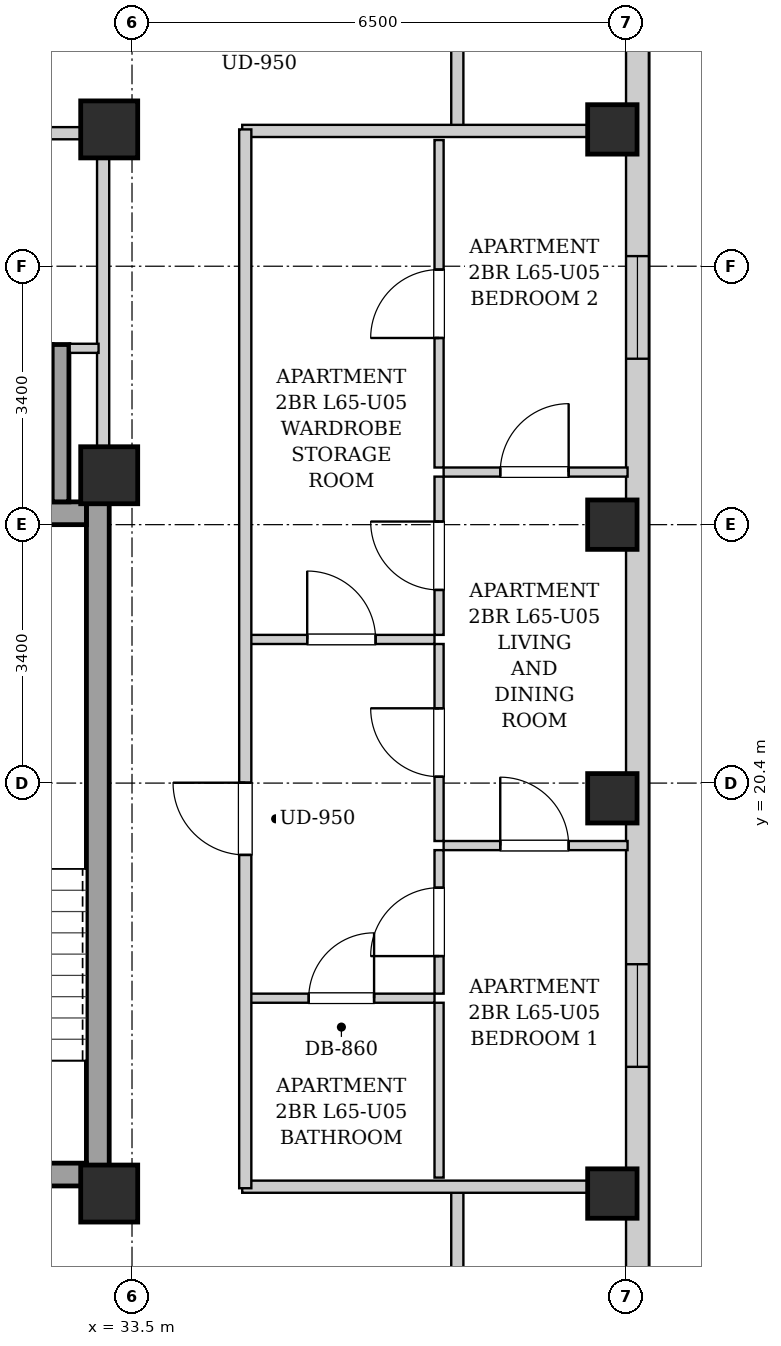
"""IFC4 building model, lengths in metres.
Left out: names, types, materials, properties, quantities, classifications, styles, units other than length and angle.
Written with IfcOpenShell. Run it as: python <this file> out.ifc"""

import sys

from ifc_helpers import new_model, si_unit, direction, frame, frame_2d, origin, origin_2d, place, context, subcontext, project, spatial, rectangle, extrude, element, fill, save


model = new_model("IFC4")
c1 = context("Model", 3, precision=1e-05, world=origin(), true_north=direction((0.0, 1.0)))
c2 = subcontext(c1, "Body", "Model", "MODEL_VIEW")
j1 = project(units=[si_unit("LENGTHUNIT", "METRE"), si_unit("PLANEANGLEUNIT", "RADIAN")], contexts=[c1])
p1 = place(None, origin())
s1 = spatial("IfcSite", under=j1, at=p1, CompositionType="ELEMENT")
p2 = place(p1, origin())
s2 = spatial("IfcBuilding", under=s1, at=p2, CompositionType="ELEMENT")
p3 = place(p2, frame((0.0, 0.0, 224.1)))
s3 = spatial("IfcBuildingStorey", under=s2, at=p3, CompositionType="ELEMENT", Elevation=224.1)
for number, where, z_axis, x_axis in (
    (1, (39.82, 15.0, 0.0), (0.0, 0.0, 1.0), (1.0, 0.0, 0.0)),
    (2, (39.82, 20.2, 0.0), (0.0, 0.0, 1.0), (1.0, 0.0, 0.0)),
    (3, (39.82, 23.8, 0.0), (0.0, 0.0, 1.0), (1.0, 0.0, 0.0)),
    (4, (39.82, 29.0, 0.0), (0.0, 0.0, 1.0), (1.0, 0.0, 0.0)),
):
    element("IfcColumn", number, at=place(p3, frame(where, z_axis=z_axis, x_axis=x_axis)), inside=s3, PredefinedType="COLUMN", context=c2, shape_type="SweptSolid", body=[
        extrude(rectangle(XDim=0.65, YDim=0.65, at=origin_2d()), origin(), (0.0, 0.0, 1.0), 3.4),
    ])
for number, where, z_axis, x_axis in (
    (5, (33.2, 15.0, 0.0), (0.0, 0.0, 1.0), (1.0, 0.0, 0.0)),
    (6, (33.2, 29.0, 0.0), (0.0, 0.0, 1.0), (1.0, 0.0, 0.0)),
    (7, (33.2, 24.45, 0.0), (0.0, 0.0, 1.0), (1.0, 0.0, 0.0)),
):
    element("IfcColumn", number, at=place(p3, frame(where, z_axis=z_axis, x_axis=x_axis)), inside=s3, PredefinedType="COLUMN", context=c2, shape_type="SweptSolid", body=[
        extrude(rectangle(XDim=0.75, YDim=0.75, at=origin_2d()), origin(), (0.0, 0.0, 1.0), 3.4),
    ])
p4 = place(p3, frame((40.15, 37.7, 0.0), z_axis=(0.0, 0.0, 1.0), x_axis=(0.0, -1.0, 0.0)))
e8 = element("IfcWall", 8, at=p4, inside=s3, PredefinedType="SOLIDWALL", context=c2, shape_type="SweptSolid", body=[
    extrude(rectangle(XDim=31.4, YDim=0.3, at=frame_2d((15.7, 0.0))), origin(), (0.0, 0.0, 1.0), 3.14),
])
p5 = place(p4, frame((28.396, 0.0, 0.55)))
e9 = element("IfcOpeningElement", 9, at=p5, cuts=e8, PredefinedType="OPENING", context=c2, shape_type="SweptSolid", body=[
    extrude(rectangle(XDim=1.35, YDim=1.2, at=frame_2d((0.675, 0.6))), frame((0.0, 0.16, 0.0), z_axis=(0.0, -1.0, 0.0), x_axis=(1.0, 0.0, 0.0)), (0.0, 0.0, 1.0), 0.32),
])
p6 = place(p4, frame((1.653, 0.0, 0.55)))
e10 = element("IfcOpeningElement", 10, at=p6, cuts=e8, PredefinedType="OPENING", context=c2, shape_type="SweptSolid", body=[
    extrude(rectangle(XDim=1.35, YDim=1.2, at=frame_2d((0.675, 0.6))), frame((0.0, 0.16, 0.0), z_axis=(0.0, -1.0, 0.0), x_axis=(1.0, 0.0, 0.0)), (0.0, 0.0, 1.0), 0.32),
])
p7 = place(p4, frame((19.683, 0.0, 0.55)))
e11 = element("IfcOpeningElement", 11, at=p7, cuts=e8, PredefinedType="OPENING", context=c2, shape_type="SweptSolid", body=[
    extrude(rectangle(XDim=1.35, YDim=1.2, at=frame_2d((0.675, 0.6))), frame((0.0, 0.16, 0.0), z_axis=(0.0, -1.0, 0.0), x_axis=(1.0, 0.0, 0.0)), (0.0, 0.0, 1.0), 0.32),
])
p8 = place(p4, frame((10.367, 0.0, 0.55)))
e12 = element("IfcOpeningElement", 12, at=p8, cuts=e8, PredefinedType="OPENING", context=c2, shape_type="SweptSolid", body=[
    extrude(rectangle(XDim=1.35, YDim=1.2, at=frame_2d((0.675, 0.6))), frame((0.0, 0.16, 0.0), z_axis=(0.0, -1.0, 0.0), x_axis=(1.0, 0.0, 0.0)), (0.0, 0.0, 1.0), 0.32),
])
p9 = place(p3, frame((33.05, 15.1, 0.0), z_axis=(0.0, 0.0, 1.0), x_axis=(0.0, 1.0, 0.0)))
e13 = element("IfcWall", 13, at=p9, inside=s3, PredefinedType="SHEAR", context=c2, shape_type="SweptSolid", body=[
    extrude(rectangle(XDim=9.0, YDim=0.3, at=frame_2d((4.5, 0.0))), origin(), (0.0, 0.0, 1.0), 3.14),
])
p10 = place(p3, frame((30.05, 23.95, 0.0), z_axis=(0.0, 0.0, 1.0), x_axis=(1.0, 0.0, 0.0)))
e14 = element("IfcWall", 14, at=p10, inside=s3, PredefinedType="SHEAR", context=c2, shape_type="SweptSolid", body=[
    extrude(rectangle(XDim=2.85, YDim=0.3, at=frame_2d((1.425, 0.0))), origin(), (0.0, 0.0, 1.0), 3.14),
])
p11 = place(p3, frame((30.05, 15.25, 0.0), z_axis=(0.0, 0.0, 1.0), x_axis=(1.0, 0.0, 0.0)))
e15 = element("IfcWall", 15, at=p11, inside=s3, PredefinedType="SHEAR", context=c2, shape_type="SweptSolid", body=[
    extrude(rectangle(XDim=2.85, YDim=0.3, at=frame_2d((1.425, 0.0))), origin(), (0.0, 0.0, 1.0), 3.14),
])
p12 = place(p11, frame((0.86, 0.0, 0.0)))
e16 = element("IfcOpeningElement", 16, at=p12, cuts=e15, PredefinedType="OPENING", context=c2, shape_type="SweptSolid", body=[
    extrude(rectangle(XDim=1.1, YDim=2.05, at=frame_2d((0.55, 1.025))), frame((0.0, 0.16, 0.0), z_axis=(0.0, -1.0, 0.0), x_axis=(1.0, 0.0, 0.0)), (0.0, 0.0, 1.0), 0.32),
])
p13 = place(p3, frame((32.56, 24.1, 0.0), z_axis=(0.0, 0.0, 1.0), x_axis=(0.0, 1.0, 0.0)))
e17 = element("IfcWall", 17, at=p13, inside=s3, PredefinedType="SHEAR", context=c2, shape_type="SweptSolid", body=[
    extrude(rectangle(XDim=2.07, YDim=0.22, at=frame_2d((1.035, 0.0))), origin(), (0.0, 0.0, 1.0), 3.14),
])
p14 = place(p3, frame((33.12, 24.12, 0.0), z_axis=(0.0, 0.0, 1.0), x_axis=(0.0, 1.0, 0.0)))
e18 = element("IfcWall", 18, at=p14, inside=s3, PredefinedType="PARTITIONING", context=c2, shape_type="SweptSolid", body=[
    extrude(rectangle(XDim=4.76, YDim=0.16, at=frame_2d((2.38, 0.0))), origin(), (0.0, 0.0, 1.0), 3.14),
])
p15 = place(p3, frame((32.68, 26.12, 0.0), z_axis=(0.0, 0.0, 1.0), x_axis=(1.0, 0.0, 0.0)))
e19 = element("IfcWall", 19, at=p15, inside=s3, PredefinedType="PARTITIONING", context=c2, shape_type="SweptSolid", body=[
    extrude(rectangle(XDim=0.38, YDim=0.12, at=frame_2d((0.19, 0.0))), origin(), (0.0, 0.0, 1.0), 3.14),
])
p16 = place(p3, frame((30.08, 28.95, 0.0), z_axis=(0.0, 0.0, 1.0), x_axis=(1.0, 0.0, 0.0)))
e20 = element("IfcWall", 20, at=p16, inside=s3, PredefinedType="PARTITIONING", context=c2, shape_type="SweptSolid", body=[
    extrude(rectangle(XDim=2.96, YDim=0.16, at=frame_2d((1.48, 0.0))), origin(), (0.0, 0.0, 1.0), 3.14),
])
p17 = place(p16, frame((1.045, 0.0, 0.0)))
e21 = element("IfcOpeningElement", 21, at=p17, cuts=e20, PredefinedType="OPENING", context=c2, shape_type="SweptSolid", body=[
    extrude(rectangle(XDim=0.86, YDim=2.05, at=frame_2d((0.43, 1.025))), frame((0.0, 0.09, 0.0), z_axis=(0.0, -1.0, 0.0), x_axis=(1.0, 0.0, 0.0)), (0.0, 0.0, 1.0), 0.18),
])
for number, where, z_axis, x_axis in (
    (22, (37.78, 13.51, 0.0), (0.0, 0.0, 1.0), (0.0, 1.0, 0.0)),
    (23, (37.78, 28.98, 0.0), (0.0, 0.0, 1.0), (0.0, 1.0, 0.0)),
):
    element("IfcWall", number, at=place(p3, frame(where, z_axis=z_axis, x_axis=x_axis)), inside=s3, PredefinedType="PARTITIONING", context=c2, shape_type="SweptSolid", body=[
        extrude(rectangle(XDim=1.58, YDim=0.16, at=frame_2d((0.79, 0.0))), origin(), (0.0, 0.0, 1.0), 3.14),
    ])
for number, where, z_axis, x_axis in (
    (24, (34.95, 15.09, 0.0), (0.0, 0.0, 1.0), (1.0, 0.0, 0.0)),
    (25, (34.95, 28.98, 0.0), (0.0, 0.0, 1.0), (1.0, 0.0, 0.0)),
):
    element("IfcWall", number, at=place(p3, frame(where, z_axis=z_axis, x_axis=x_axis)), inside=s3, PredefinedType="PARTITIONING", context=c2, shape_type="SweptSolid", body=[
        extrude(rectangle(XDim=5.07, YDim=0.16, at=frame_2d((2.535, 0.0))), origin(), (0.0, 0.0, 1.0), 2.668),
    ])
p18 = place(p3, frame((35.03, 22.29, 0.0), z_axis=(0.0, 0.0, 1.0), x_axis=(1.0, 0.0, 0.0)))
e26 = element("IfcWall", 26, at=p18, inside=s3, PredefinedType="PARTITIONING", context=c2, shape_type="SweptSolid", body=[
    extrude(rectangle(XDim=2.45, YDim=0.12, at=frame_2d((1.225, 0.0))), origin(), (0.0, 0.0, 1.0), 3.14),
])
p19 = place(p18, frame((0.775, 0.0, 0.0)))
e27 = element("IfcOpeningElement", 27, at=p19, cuts=e26, PredefinedType="OPENING", context=c2, shape_type="SweptSolid", body=[
    extrude(rectangle(XDim=0.9, YDim=2.05, at=frame_2d((0.45, 1.025))), frame((0.0, 0.07, 0.0), z_axis=(0.0, -1.0, 0.0), x_axis=(1.0, 0.0, 0.0)), (0.0, 0.0, 1.0), 0.14),
])
p20 = place(p3, frame((37.54, 22.35, 0.0), z_axis=(0.0, 0.0, 1.0), x_axis=(0.0, 1.0, 0.0)))
e28 = element("IfcWall", 28, at=p20, inside=s3, PredefinedType="PARTITIONING", context=c2, shape_type="SweptSolid", body=[
    extrude(rectangle(XDim=2.082, YDim=0.12, at=frame_2d((1.041, 0.0))), origin(), (0.0, 0.0, 1.0), 3.14),
])
p21 = place(p20, frame((0.591, 0.0, 0.0)))
e29 = element("IfcOpeningElement", 29, at=p21, cuts=e28, PredefinedType="OPENING", context=c2, shape_type="SweptSolid", body=[
    extrude(rectangle(XDim=0.9, YDim=2.05, at=frame_2d((0.45, 1.025))), frame((0.0, 0.07, 0.0), z_axis=(0.0, -1.0, 0.0), x_axis=(1.0, 0.0, 0.0)), (0.0, 0.0, 1.0), 0.14),
])
p22 = place(p3, frame((37.54, 24.552, 0.0), z_axis=(0.0, 0.0, 1.0), x_axis=(0.0, 1.0, 0.0)))
e30 = element("IfcWall", 30, at=p22, inside=s3, PredefinedType="PARTITIONING", context=c2, shape_type="SweptSolid", body=[
    extrude(rectangle(XDim=4.308, YDim=0.12, at=frame_2d((2.154, 0.0))), origin(), (0.0, 0.0, 1.0), 3.14),
])
p23 = place(p22, frame((1.704, 0.0, 0.0)))
e31 = element("IfcOpeningElement", 31, at=p23, cuts=e30, PredefinedType="OPENING", context=c2, shape_type="SweptSolid", body=[
    extrude(rectangle(XDim=0.9, YDim=2.05, at=frame_2d((0.45, 1.025))), frame((0.0, 0.07, 0.0), z_axis=(0.0, -1.0, 0.0), x_axis=(1.0, 0.0, 0.0)), (0.0, 0.0, 1.0), 0.14),
])
p24 = place(p3, frame((35.03, 17.57, 0.0), z_axis=(0.0, 0.0, 1.0), x_axis=(1.0, 0.0, 0.0)))
e32 = element("IfcWall", 32, at=p24, inside=s3, PredefinedType="PARTITIONING", context=c2, shape_type="SweptSolid", body=[
    extrude(rectangle(XDim=2.45, YDim=0.12, at=frame_2d((1.225, 0.0))), origin(), (0.0, 0.0, 1.0), 3.14),
])
p25 = place(p24, frame((0.795, 0.0, 0.0)))
e33 = element("IfcOpeningElement", 33, at=p25, cuts=e32, PredefinedType="OPENING", context=c2, shape_type="SweptSolid", body=[
    extrude(rectangle(XDim=0.86, YDim=2.05, at=frame_2d((0.43, 1.025))), frame((0.0, 0.07, 0.0), z_axis=(0.0, -1.0, 0.0), x_axis=(1.0, 0.0, 0.0)), (0.0, 0.0, 1.0), 0.14),
])
p26 = place(p3, frame((37.54, 15.21, 0.0), z_axis=(0.0, 0.0, 1.0), x_axis=(0.0, 1.0, 0.0)))
e34 = element("IfcWall", 34, at=p26, inside=s3, PredefinedType="PARTITIONING", context=c2, shape_type="SweptSolid", body=[
    extrude(rectangle(XDim=2.3, YDim=0.12, at=frame_2d((1.15, 0.0))), origin(), (0.0, 0.0, 1.0), 3.14),
])
p27 = place(p3, frame((37.54, 17.63, 0.0), z_axis=(0.0, 0.0, 1.0), x_axis=(0.0, 1.0, 0.0)))
e35 = element("IfcWall", 35, at=p27, inside=s3, PredefinedType="PARTITIONING", context=c2, shape_type="SweptSolid", body=[
    extrude(rectangle(XDim=1.888, YDim=0.12, at=frame_2d((0.944, 0.0))), origin(), (0.0, 0.0, 1.0), 3.14),
])
p28 = place(p27, frame((0.494, 0.0, 0.0)))
e36 = element("IfcOpeningElement", 36, at=p28, cuts=e35, PredefinedType="OPENING", context=c2, shape_type="SweptSolid", body=[
    extrude(rectangle(XDim=0.9, YDim=2.05, at=frame_2d((0.45, 1.025))), frame((0.0, 0.07, 0.0), z_axis=(0.0, -1.0, 0.0), x_axis=(1.0, 0.0, 0.0)), (0.0, 0.0, 1.0), 0.14),
])
p29 = place(p3, frame((37.54, 19.638, 0.0), z_axis=(0.0, 0.0, 1.0), x_axis=(0.0, 1.0, 0.0)))
e37 = element("IfcWall", 37, at=p29, inside=s3, PredefinedType="PARTITIONING", context=c2, shape_type="SweptSolid", body=[
    extrude(rectangle(XDim=2.592, YDim=0.12, at=frame_2d((1.296, 0.0))), origin(), (0.0, 0.0, 1.0), 3.14),
])
p30 = place(p29, frame((0.846, 0.0, 0.0)))
e38 = element("IfcOpeningElement", 38, at=p30, cuts=e37, PredefinedType="OPENING", context=c2, shape_type="SweptSolid", body=[
    extrude(rectangle(XDim=0.9, YDim=2.05, at=frame_2d((0.45, 1.025))), frame((0.0, 0.07, 0.0), z_axis=(0.0, -1.0, 0.0), x_axis=(1.0, 0.0, 0.0)), (0.0, 0.0, 1.0), 0.14),
])
p31 = place(p3, frame((37.6, 19.578, 0.0), z_axis=(0.0, 0.0, 1.0), x_axis=(1.0, 0.0, 0.0)))
e39 = element("IfcWall", 39, at=p31, inside=s3, PredefinedType="PARTITIONING", context=c2, shape_type="SweptSolid", body=[
    extrude(rectangle(XDim=2.42, YDim=0.12, at=frame_2d((1.21, 0.0))), origin(), (0.0, 0.0, 1.0), 3.14),
])
p32 = place(p31, frame((0.745, 0.0, 0.0)))
e40 = element("IfcOpeningElement", 40, at=p32, cuts=e39, PredefinedType="OPENING", context=c2, shape_type="SweptSolid", body=[
    extrude(rectangle(XDim=0.9, YDim=2.05, at=frame_2d((0.45, 1.025))), frame((0.0, 0.07, 0.0), z_axis=(0.0, -1.0, 0.0), x_axis=(1.0, 0.0, 0.0)), (0.0, 0.0, 1.0), 0.14),
])
p33 = place(p3, frame((37.6, 24.492, 0.0), z_axis=(0.0, 0.0, 1.0), x_axis=(1.0, 0.0, 0.0)))
e41 = element("IfcWall", 41, at=p33, inside=s3, PredefinedType="PARTITIONING", context=c2, shape_type="SweptSolid", body=[
    extrude(rectangle(XDim=2.42, YDim=0.12, at=frame_2d((1.21, 0.0))), origin(), (0.0, 0.0, 1.0), 2.878),
])
p34 = place(p33, frame((0.745, 0.0, 0.0)))
e42 = element("IfcOpeningElement", 42, at=p34, cuts=e41, PredefinedType="OPENING", context=c2, shape_type="SweptSolid", body=[
    extrude(rectangle(XDim=0.9, YDim=2.05, at=frame_2d((0.45, 1.025))), frame((0.0, 0.07, 0.0), z_axis=(0.0, -1.0, 0.0), x_axis=(1.0, 0.0, 0.0)), (0.0, 0.0, 1.0), 0.14),
])
p35 = place(p3, frame((34.99, 15.07, 0.0), z_axis=(0.0, 0.0, 1.0), x_axis=(0.0, 1.0, 0.0)))
e43 = element("IfcWall", 43, at=p35, inside=s3, PredefinedType="PARTITIONING", context=c2, shape_type="SweptSolid", body=[
    extrude(rectangle(XDim=13.93, YDim=0.16, at=frame_2d((6.965, 0.0))), origin(), (0.0, 0.0, 1.0), 3.14),
])
p36 = place(p35, frame((4.385, 0.0, 0.0)))
e44 = element("IfcOpeningElement", 44, at=p36, cuts=e43, PredefinedType="OPENING", context=c2, shape_type="SweptSolid", body=[
    extrude(rectangle(XDim=0.95, YDim=2.1, at=frame_2d((0.475, 1.05))), frame((0.0, 0.09, 0.0), z_axis=(0.0, -1.0, 0.0), x_axis=(1.0, 0.0, 0.0)), (0.0, 0.0, 1.0), 0.18),
])
p37 = place(p19, origin())
e45 = element("IfcDoor", 45, at=p37, inside=s3, OperationType="SINGLE_SWING_LEFT", PredefinedType="DOOR", context=c2, shape_type="SweptSolid", body=[
    extrude(rectangle(XDim=0.9, YDim=2.05, at=frame_2d((0.45, 1.025))), frame((0.0, 0.025, 0.0), z_axis=(0.0, -1.0, 0.0), x_axis=(1.0, 0.0, 0.0)), (0.0, 0.0, 1.0), 0.05),
])
fill(e27, e45)
p38 = place(p21, origin())
e46 = element("IfcDoor", 46, at=p38, inside=s3, OperationType="SINGLE_SWING_RIGHT", PredefinedType="DOOR", context=c2, shape_type="SweptSolid", body=[
    extrude(rectangle(XDim=0.9, YDim=2.05, at=frame_2d((0.45, 1.025))), frame((0.0, 0.025, 0.0), z_axis=(0.0, -1.0, 0.0), x_axis=(1.0, 0.0, 0.0)), (0.0, 0.0, 1.0), 0.05),
])
fill(e29, e46)
p39 = place(p23, origin())
e47 = element("IfcDoor", 47, at=p39, inside=s3, OperationType="SINGLE_SWING_LEFT", PredefinedType="DOOR", context=c2, shape_type="SweptSolid", body=[
    extrude(rectangle(XDim=0.9, YDim=2.05, at=frame_2d((0.45, 1.025))), frame((0.0, 0.025, 0.0), z_axis=(0.0, -1.0, 0.0), x_axis=(1.0, 0.0, 0.0)), (0.0, 0.0, 1.0), 0.05),
])
fill(e31, e47)
p40 = place(p25, origin())
e48 = element("IfcDoor", 48, at=p40, inside=s3, OperationType="SINGLE_SWING_RIGHT", PredefinedType="DOOR", context=c2, shape_type="SweptSolid", body=[
    extrude(rectangle(XDim=0.86, YDim=2.05, at=frame_2d((0.43, 1.025))), frame((0.0, 0.025, 0.0), z_axis=(0.0, -1.0, 0.0), x_axis=(1.0, 0.0, 0.0)), (0.0, 0.0, 1.0), 0.05),
])
fill(e33, e48)
p41 = place(p28, origin())
e49 = element("IfcDoor", 49, at=p41, inside=s3, OperationType="SINGLE_SWING_LEFT", PredefinedType="DOOR", context=c2, shape_type="SweptSolid", body=[
    extrude(rectangle(XDim=0.9, YDim=2.05, at=frame_2d((0.45, 1.025))), frame((0.0, 0.025, 0.0), z_axis=(0.0, -1.0, 0.0), x_axis=(1.0, 0.0, 0.0)), (0.0, 0.0, 1.0), 0.05),
])
fill(e36, e49)
p42 = place(p30, origin())
e50 = element("IfcDoor", 50, at=p42, inside=s3, OperationType="SINGLE_SWING_RIGHT", PredefinedType="DOOR", context=c2, shape_type="SweptSolid", body=[
    extrude(rectangle(XDim=0.9, YDim=2.05, at=frame_2d((0.45, 1.025))), frame((0.0, 0.025, 0.0), z_axis=(0.0, -1.0, 0.0), x_axis=(1.0, 0.0, 0.0)), (0.0, 0.0, 1.0), 0.05),
])
fill(e38, e50)
p43 = place(p32, origin())
e51 = element("IfcDoor", 51, at=p43, inside=s3, OperationType="SINGLE_SWING_LEFT", PredefinedType="DOOR", context=c2, shape_type="SweptSolid", body=[
    extrude(rectangle(XDim=0.9, YDim=2.05, at=frame_2d((0.45, 1.025))), frame((0.0, 0.025, 0.0), z_axis=(0.0, -1.0, 0.0), x_axis=(1.0, 0.0, 0.0)), (0.0, 0.0, 1.0), 0.05),
])
fill(e40, e51)
p44 = place(p34, origin())
e52 = element("IfcDoor", 52, at=p44, inside=s3, OperationType="SINGLE_SWING_RIGHT", PredefinedType="DOOR", context=c2, shape_type="SweptSolid", body=[
    extrude(rectangle(XDim=0.9, YDim=2.05, at=frame_2d((0.45, 1.025))), frame((0.0, 0.025, 0.0), z_axis=(0.0, -1.0, 0.0), x_axis=(1.0, 0.0, 0.0)), (0.0, 0.0, 1.0), 0.05),
])
fill(e42, e52)
p45 = place(p36, origin())
e53 = element("IfcDoor", 53, at=p45, inside=s3, OperationType="SINGLE_SWING_RIGHT", PredefinedType="DOOR", context=c2, shape_type="SweptSolid", body=[
    extrude(rectangle(XDim=0.95, YDim=2.1, at=frame_2d((0.475, 1.05))), frame((0.0, 0.025, 0.0), z_axis=(0.0, -1.0, 0.0), x_axis=(1.0, 0.0, 0.0)), (0.0, 0.0, 1.0), 0.05),
])
fill(e44, e53)
p46 = place(p7, origin())
e54 = element("IfcWindow", 54, at=p46, inside=s3, PartitioningType="SINGLE_PANEL", PredefinedType="WINDOW", context=c2, shape_type="SweptSolid", body=[
    extrude(rectangle(XDim=1.35, YDim=1.2, at=frame_2d((0.675, 0.6))), frame((0.0, 0.03, 0.0), z_axis=(0.0, -1.0, 0.0), x_axis=(1.0, 0.0, 0.0)), (0.0, 0.0, 1.0), 0.06),
])
fill(e11, e54)
p47 = place(p8, origin())
e55 = element("IfcWindow", 55, at=p47, inside=s3, PartitioningType="SINGLE_PANEL", PredefinedType="WINDOW", context=c2, shape_type="SweptSolid", body=[
    extrude(rectangle(XDim=1.35, YDim=1.2, at=frame_2d((0.675, 0.6))), frame((0.0, 0.03, 0.0), z_axis=(0.0, -1.0, 0.0), x_axis=(1.0, 0.0, 0.0)), (0.0, 0.0, 1.0), 0.06),
])
fill(e12, e55)
save(model, sys.argv[1])
